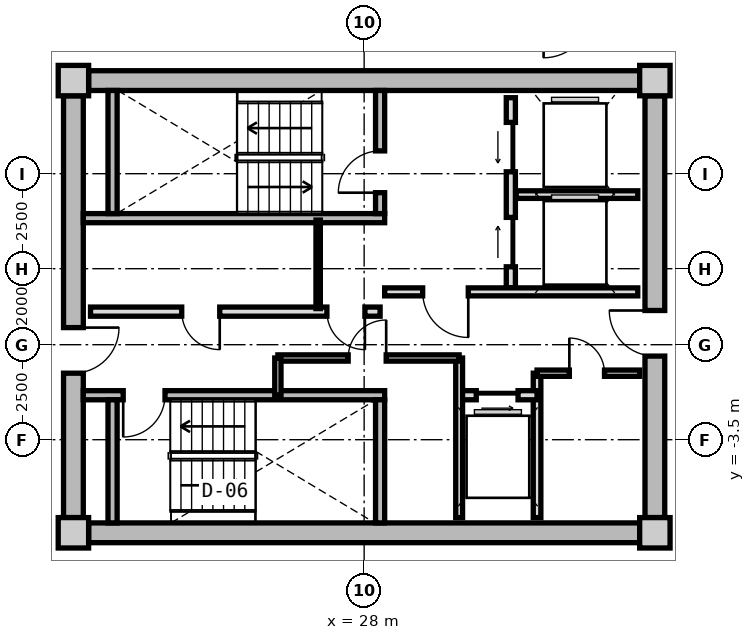
"""IFC4 building model, lengths in metres.
Left out: names, types, materials, properties, quantities, classifications, styles, units other than length and angle.
Written with IfcOpenShell. Run it as: python <this file> out.ifc"""

import sys

from ifc_helpers import new_model, si_unit, direction, frame, frame_2d, origin, origin_2d, place, context, subcontext, project, spatial, rectangle, extrude, source, transform, mapped, element, fill, save


model = new_model("IFC4")
c1 = context("Model", 3, precision=1e-05, world=origin(), true_north=direction((0.0, 1.0)))
c2 = subcontext(c1, "Body", "Model", "MODEL_VIEW")
j1 = project(units=[si_unit("LENGTHUNIT", "METRE"), si_unit("PLANEANGLEUNIT", "RADIAN")], contexts=[c1])
p1 = place(None, origin())
s1 = spatial("IfcSite", under=j1, at=p1, CompositionType="ELEMENT")
p2 = place(p1, origin())
s2 = spatial("IfcBuilding", under=s1, at=p2, CompositionType="ELEMENT")
p3 = place(p2, frame((0.0, 0.0, 213.9)))
s3 = spatial("IfcBuildingStorey", under=s2, at=p3, CompositionType="ELEMENT", Elevation=213.9)
m1 = source(origin(), c2, "Body", "SweptSolid", [
    extrude(rectangle(XDim=0.8, YDim=0.8, at=origin_2d()), origin(), (0.0, 0.0, 1.0), 3.05),
])
for number, where, z_axis, x_axis in (
    (1, (20.35, -5.95, 0.0), (0.0, 0.0, 1.0), (1.0, 0.0, 0.0)),
    (2, (35.65, -5.95, 0.0), (0.0, 0.0, 1.0), (1.0, 0.0, 0.0)),
    (3, (35.65, 5.95, 0.0), (0.0, 0.0, 1.0), (1.0, 0.0, 0.0)),
    (4, (20.35, 5.95, 0.0), (0.0, 0.0, 1.0), (1.0, 0.0, 0.0)),
):
    element("IfcColumn", number, at=place(p3, frame(where, z_axis=z_axis, x_axis=x_axis)), inside=s3, PredefinedType="COLUMN", context=c2, shape_type="MappedRepresentation", body=[
        mapped(m1, transform((0.0, 0.0, 0.0), x_axis=(1.0, 0.0, 0.0), y_axis=(0.0, 1.0, 0.0), z_axis=(0.0, 0.0, 1.0), scale=1.0)),
    ])
m2 = source(origin(), c2, "Body", "SweptSolid", [
    extrude(rectangle(XDim=14.5, YDim=0.52, at=frame_2d((7.25, 0.0))), origin(), (0.0, 0.0, 1.0), 2.76),
])
for number, where, z_axis, x_axis in (
    (5, (20.75, 5.95, 0.0), (0.0, 0.0, 1.0), (1.0, 0.0, 0.0)),
    (6, (35.25, -5.95, 0.0), (0.0, 0.0, 1.0), (-1.0, 0.0, 0.0)),
):
    element("IfcWall", number, at=place(p3, frame(where, z_axis=z_axis, x_axis=x_axis)), inside=s3, PredefinedType="SHEAR", context=c2, shape_type="MappedRepresentation", body=[
        mapped(m2, transform((0.0, 0.0, 0.0), x_axis=(1.0, 0.0, 0.0), y_axis=(0.0, 1.0, 0.0), z_axis=(0.0, 0.0, 1.0), scale=1.0)),
    ])
m3 = source(origin(), c2, "Body", "SweptSolid", [
    extrude(rectangle(XDim=11.1, YDim=0.52, at=frame_2d((5.55, 0.0))), origin(), (0.0, 0.0, 1.0), 2.76),
])
p4 = place(p3, frame((20.35, -5.55, 0.0), z_axis=(0.0, 0.0, 1.0), x_axis=(0.0, 1.0, 0.0)))
e7 = element("IfcWall", 7, at=p4, inside=s3, PredefinedType="SHEAR", context=c2, shape_type="MappedRepresentation", body=[
    mapped(m3, transform((0.0, 0.0, 0.0), x_axis=(1.0, 0.0, 0.0), y_axis=(0.0, 1.0, 0.0), z_axis=(0.0, 0.0, 1.0), scale=1.0)),
])
p5 = place(p4, frame((3.8, 0.0, 0.0)))
e8 = element("IfcOpeningElement", 8, at=p5, cuts=e7, PredefinedType="OPENING", context=c2, shape_type="SweptSolid", body=[
    extrude(rectangle(XDim=1.2, YDim=2.15, at=frame_2d((0.6, 1.075))), frame((0.0, 0.27, 0.0), z_axis=(0.0, -1.0, 0.0), x_axis=(1.0, 0.0, 0.0)), (0.0, 0.0, 1.0), 0.54),
])
p6 = place(p3, frame((35.65, 5.55, 0.0), z_axis=(0.0, 0.0, 1.0), x_axis=(0.0, -1.0, 0.0)))
e9 = element("IfcWall", 9, at=p6, inside=s3, PredefinedType="SHEAR", context=c2, shape_type="MappedRepresentation", body=[
    mapped(m3, transform((0.0, 0.0, 0.0), x_axis=(1.0, 0.0, 0.0), y_axis=(0.0, 1.0, 0.0), z_axis=(0.0, 0.0, 1.0), scale=1.0)),
])
p7 = place(p6, frame((5.65, 0.0, 0.0)))
e10 = element("IfcOpeningElement", 10, at=p7, cuts=e9, PredefinedType="OPENING", context=c2, shape_type="SweptSolid", body=[
    extrude(rectangle(XDim=1.2, YDim=2.15, at=frame_2d((0.6, 1.075))), frame((0.0, 0.27, 0.0), z_axis=(0.0, -1.0, 0.0), x_axis=(1.0, 0.0, 0.0)), (0.0, 0.0, 1.0), 0.54),
])
m4 = source(origin(), c2, "Body", "SweptSolid", [
    extrude(rectangle(XDim=7.93, YDim=0.24, at=frame_2d((3.965, 0.0))), origin(), (0.0, 0.0, 1.0), 2.76),
])
p8 = place(p3, frame((20.61, 2.33, 0.0), z_axis=(0.0, 0.0, 1.0), x_axis=(1.0, 0.0, 0.0)))
e11 = element("IfcWall", 11, at=p8, inside=s3, PredefinedType="PARTITIONING", context=c2, shape_type="MappedRepresentation", body=[
    mapped(m4, transform((0.0, 0.0, 0.0), x_axis=(1.0, 0.0, 0.0), y_axis=(0.0, 1.0, 0.0), z_axis=(0.0, 0.0, 1.0), scale=1.0)),
])
m5 = source(origin(), c2, "Body", "SweptSolid", [
    extrude(rectangle(XDim=3.24, YDim=0.24, at=frame_2d((1.62, 0.0))), origin(), (0.0, 0.0, 1.0), 2.76),
])
p9 = place(p3, frame((21.38, 2.45, 0.0), z_axis=(0.0, 0.0, 1.0), x_axis=(0.0, 1.0, 0.0)))
e12 = element("IfcWall", 12, at=p9, inside=s3, PredefinedType="PARTITIONING", context=c2, shape_type="MappedRepresentation", body=[
    mapped(m5, transform((0.0, 0.0, 0.0), x_axis=(1.0, 0.0, 0.0), y_axis=(0.0, 1.0, 0.0), z_axis=(0.0, 0.0, 1.0), scale=1.0)),
])
p10 = place(p3, frame((28.42, 2.45, 0.0), z_axis=(0.0, 0.0, 1.0), x_axis=(0.0, 1.0, 0.0)))
e13 = element("IfcWall", 13, at=p10, inside=s3, PredefinedType="PARTITIONING", context=c2, shape_type="MappedRepresentation", body=[
    mapped(m5, transform((0.0, 0.0, 0.0), x_axis=(1.0, 0.0, 0.0), y_axis=(0.0, 1.0, 0.0), z_axis=(0.0, 0.0, 1.0), scale=1.0)),
])
p11 = place(p10, frame((0.55, 0.0, 0.0)))
e14 = element("IfcOpeningElement", 14, at=p11, cuts=e13, PredefinedType="OPENING", context=c2, shape_type="SweptSolid", body=[
    extrude(rectangle(XDim=1.1, YDim=2.15, at=frame_2d((0.55, 1.075))), frame((0.0, 0.13, 0.0), z_axis=(0.0, -1.0, 0.0), x_axis=(1.0, 0.0, 0.0)), (0.0, 0.0, 1.0), 0.26),
])
p12 = place(p3, frame((20.61, -2.33, 0.0), z_axis=(0.0, 0.0, 1.0), x_axis=(1.0, 0.0, 0.0)))
e15 = element("IfcWall", 15, at=p12, inside=s3, PredefinedType="PARTITIONING", context=c2, shape_type="MappedRepresentation", body=[
    mapped(m4, transform((0.0, 0.0, 0.0), x_axis=(1.0, 0.0, 0.0), y_axis=(0.0, 1.0, 0.0), z_axis=(0.0, 0.0, 1.0), scale=1.0)),
])
p13 = place(p12, frame((1.05, 0.0, 0.0)))
e16 = element("IfcOpeningElement", 16, at=p13, cuts=e15, PredefinedType="OPENING", context=c2, shape_type="SweptSolid", body=[
    extrude(rectangle(XDim=1.1, YDim=2.15, at=frame_2d((0.55, 1.075))), frame((0.0, 0.13, 0.0), z_axis=(0.0, -1.0, 0.0), x_axis=(1.0, 0.0, 0.0)), (0.0, 0.0, 1.0), 0.26),
])
for number, where, z_axis, x_axis in (
    (17, (21.38, -5.69, 0.0), (0.0, 0.0, 1.0), (0.0, 1.0, 0.0)),
    (18, (28.42, -5.69, 0.0), (0.0, 0.0, 1.0), (0.0, 1.0, 0.0)),
):
    element("IfcWall", number, at=place(p3, frame(where, z_axis=z_axis, x_axis=x_axis)), inside=s3, PredefinedType="PARTITIONING", context=c2, shape_type="MappedRepresentation", body=[
        mapped(m5, transform((0.0, 0.0, 0.0), x_axis=(1.0, 0.0, 0.0), y_axis=(0.0, 1.0, 0.0), z_axis=(0.0, 0.0, 1.0), scale=1.0)),
    ])
m6 = source(origin(), c2, "Body", "SweptSolid", [
    extrude(rectangle(XDim=5.0, YDim=0.24, at=frame_2d((2.5, 0.0))), origin(), (0.0, 0.0, 1.0), 2.745),
])
p14 = place(p3, frame((31.86, 0.5, 0.0), z_axis=(0.0, 0.0, 1.0), x_axis=(0.0, 1.0, 0.0)))
e19 = element("IfcWall", 19, at=p14, inside=s3, PredefinedType="PARTITIONING", context=c2, shape_type="MappedRepresentation", body=[
    mapped(m6, transform((0.0, 0.0, 0.0), x_axis=(1.0, 0.0, 0.0), y_axis=(0.0, 1.0, 0.0), z_axis=(0.0, 0.0, 1.0), scale=1.0)),
])
p15 = place(p14, frame((3.05, 0.0, 0.0)))
e20 = element("IfcOpeningElement", 20, at=p15, cuts=e19, PredefinedType="OPENING", context=c2, shape_type="SweptSolid", body=[
    extrude(rectangle(XDim=1.3, YDim=2.2, at=frame_2d((0.65, 1.1))), frame((0.0, 0.13, 0.0), z_axis=(0.0, -1.0, 0.0), x_axis=(1.0, 0.0, 0.0)), (0.0, 0.0, 1.0), 0.26),
])
p16 = place(p14, frame((0.55, 0.0, 0.0)))
e21 = element("IfcOpeningElement", 21, at=p16, cuts=e19, PredefinedType="OPENING", context=c2, shape_type="SweptSolid", body=[
    extrude(rectangle(XDim=1.3, YDim=2.2, at=frame_2d((0.65, 1.1))), frame((0.0, 0.13, 0.0), z_axis=(0.0, -1.0, 0.0), x_axis=(1.0, 0.0, 0.0)), (0.0, 0.0, 1.0), 0.26),
])
m7 = source(origin(), c2, "Body", "SweptSolid", [
    extrude(rectangle(XDim=3.2, YDim=0.2, at=frame_2d((1.6, 0.0))), origin(), (0.0, 0.0, 1.0), 2.745),
])
p17 = place(p3, frame((32.0, 2.95, 0.0), z_axis=(0.0, 0.0, 1.0), x_axis=(1.0, 0.0, 0.0)))
e22 = element("IfcWall", 22, at=p17, inside=s3, PredefinedType="PARTITIONING", context=c2, shape_type="MappedRepresentation", body=[
    mapped(m7, transform((0.0, 0.0, 0.0), x_axis=(1.0, 0.0, 0.0), y_axis=(0.0, 1.0, 0.0), z_axis=(0.0, 0.0, 1.0), scale=1.0)),
])
m8 = source(origin(), c2, "Body", "SweptSolid", [
    extrude(rectangle(XDim=6.66, YDim=0.21, at=frame_2d((3.33, 0.0))), origin(), (0.0, 0.0, 1.0), 2.745),
])
p18 = place(p3, frame((28.54, 0.39, 0.0), z_axis=(0.0, 0.0, 1.0), x_axis=(1.0, 0.0, 0.0)))
e23 = element("IfcWall", 23, at=p18, inside=s3, PredefinedType="PARTITIONING", context=c2, shape_type="MappedRepresentation", body=[
    mapped(m8, transform((0.0, 0.0, 0.0), x_axis=(1.0, 0.0, 0.0), y_axis=(0.0, 1.0, 0.0), z_axis=(0.0, 0.0, 1.0), scale=1.0)),
])
p19 = place(p18, frame((1.0, 0.0, 0.0)))
e24 = element("IfcOpeningElement", 24, at=p19, cuts=e23, PredefinedType="OPENING", context=c2, shape_type="SweptSolid", body=[
    extrude(rectangle(XDim=1.2, YDim=2.15, at=frame_2d((0.6, 1.075))), frame((0.0, 0.115, 0.0), z_axis=(0.0, -1.0, 0.0), x_axis=(1.0, 0.0, 0.0)), (0.0, 0.0, 1.0), 0.23),
])
m9 = source(origin(), c2, "Body", "SweptSolid", [
    extrude(rectangle(XDim=7.62, YDim=0.24, at=frame_2d((3.81, 0.0))), origin(), (0.0, 0.0, 1.0), 2.745),
])
p20 = place(p3, frame((20.8, -0.13, 0.0), z_axis=(0.0, 0.0, 1.0), x_axis=(1.0, 0.0, 0.0)))
e25 = element("IfcWall", 25, at=p20, inside=s3, PredefinedType="PARTITIONING", context=c2, shape_type="MappedRepresentation", body=[
    mapped(m9, transform((0.0, 0.0, 0.0), x_axis=(1.0, 0.0, 0.0), y_axis=(0.0, 1.0, 0.0), z_axis=(0.0, 0.0, 1.0), scale=1.0)),
])
p21 = place(p20, frame((6.22, 0.0, 0.0)))
e26 = element("IfcOpeningElement", 26, at=p21, cuts=e25, PredefinedType="OPENING", context=c2, shape_type="SweptSolid", body=[
    extrude(rectangle(XDim=1.0, YDim=2.1, at=frame_2d((0.5, 1.05))), frame((0.0, 0.13, 0.0), z_axis=(0.0, -1.0, 0.0), x_axis=(1.0, 0.0, 0.0)), (0.0, 0.0, 1.0), 0.26),
])
p22 = place(p20, frame((2.4, 0.0, 0.0)))
e27 = element("IfcOpeningElement", 27, at=p22, cuts=e25, PredefinedType="OPENING", context=c2, shape_type="SweptSolid", body=[
    extrude(rectangle(XDim=1.0, YDim=2.1, at=frame_2d((0.5, 1.05))), frame((0.0, 0.13, 0.0), z_axis=(0.0, -1.0, 0.0), x_axis=(1.0, 0.0, 0.0)), (0.0, 0.0, 1.0), 0.26),
])
m10 = source(origin(), c2, "Body", "SweptSolid", [
    extrude(rectangle(XDim=2.33, YDim=0.115, at=frame_2d((1.165, 0.0))), origin(), (0.0, 0.0, 1.0), 2.745),
])
p23 = place(p3, frame((26.79, -0.05, 0.0), z_axis=(0.0, 0.0, 1.0), x_axis=(0.0, 1.0, 0.0)))
e28 = element("IfcWall", 28, at=p23, inside=s3, PredefinedType="PARTITIONING", context=c2, shape_type="MappedRepresentation", body=[
    mapped(m10, transform((0.0, 0.0, 0.0), x_axis=(1.0, 0.0, 0.0), y_axis=(0.0, 1.0, 0.0), z_axis=(0.0, 0.0, 1.0), scale=1.0)),
])
m11 = source(origin(), c2, "Body", "SweptSolid", [
    extrude(rectangle(XDim=3.8, YDim=0.2, at=frame_2d((1.9, 0.0))), origin(), (0.0, 0.0, 1.0), 2.745),
])
p24 = place(p3, frame((32.55, -5.55, 0.0), z_axis=(0.0, 0.0, 1.0), x_axis=(0.0, 1.0, 0.0)))
e29 = element("IfcWall", 29, at=p24, inside=s3, PredefinedType="PARTITIONING", context=c2, shape_type="MappedRepresentation", body=[
    mapped(m11, transform((0.0, 0.0, 0.0), x_axis=(1.0, 0.0, 0.0), y_axis=(0.0, 1.0, 0.0), z_axis=(0.0, 0.0, 1.0), scale=1.0)),
])
m12 = source(origin(), c2, "Body", "SweptSolid", [
    extrude(rectangle(XDim=2.05, YDim=0.24, at=frame_2d((1.025, 0.0))), origin(), (0.0, 0.0, 1.0), 2.745),
])
p25 = place(p3, frame((30.5, -2.33, 0.0), z_axis=(0.0, 0.0, 1.0), x_axis=(1.0, 0.0, 0.0)))
e30 = element("IfcWall", 30, at=p25, inside=s3, PredefinedType="PARTITIONING", context=c2, shape_type="MappedRepresentation", body=[
    mapped(m12, transform((0.0, 0.0, 0.0), x_axis=(1.0, 0.0, 0.0), y_axis=(0.0, 1.0, 0.0), z_axis=(0.0, 0.0, 1.0), scale=1.0)),
])
p26 = place(p25, frame((0.45, 0.0, 0.0)))
e31 = element("IfcOpeningElement", 31, at=p26, cuts=e30, PredefinedType="OPENING", context=c2, shape_type="SweptSolid", body=[
    extrude(rectangle(XDim=1.1, YDim=2.2, at=frame_2d((0.55, 1.1))), frame((0.0, 0.13, 0.0), z_axis=(0.0, -1.0, 0.0), x_axis=(1.0, 0.0, 0.0)), (0.0, 0.0, 1.0), 0.26),
])
m13 = source(origin(), c2, "Body", "SweptSolid", [
    extrude(rectangle(XDim=4.2, YDim=0.18, at=frame_2d((2.1, 0.0))), origin(), (0.0, 0.0, 1.0), 2.745),
])
p27 = place(p3, frame((30.5, -5.55, 0.0), z_axis=(0.0, 0.0, 1.0), x_axis=(0.0, 1.0, 0.0)))
e32 = element("IfcWall", 32, at=p27, inside=s3, PredefinedType="PARTITIONING", context=c2, shape_type="MappedRepresentation", body=[
    mapped(m13, transform((0.0, 0.0, 0.0), x_axis=(1.0, 0.0, 0.0), y_axis=(0.0, 1.0, 0.0), z_axis=(0.0, 0.0, 1.0), scale=1.0)),
])
m14 = source(origin(), c2, "Body", "SweptSolid", [
    extrude(rectangle(XDim=4.77, YDim=0.165, at=frame_2d((2.385, 0.0))), origin(), (0.0, 0.0, 1.0), 2.745),
])
p28 = place(p3, frame((25.73, -1.35, 0.0), z_axis=(0.0, 0.0, 1.0), x_axis=(1.0, 0.0, 0.0)))
e33 = element("IfcWall", 33, at=p28, inside=s3, PredefinedType="PARTITIONING", context=c2, shape_type="MappedRepresentation", body=[
    mapped(m14, transform((0.0, 0.0, 0.0), x_axis=(1.0, 0.0, 0.0), y_axis=(0.0, 1.0, 0.0), z_axis=(0.0, 0.0, 1.0), scale=1.0)),
])
p29 = place(p28, frame((1.85, 0.0, 0.0)))
e34 = element("IfcOpeningElement", 34, at=p29, cuts=e33, PredefinedType="OPENING", context=c2, shape_type="SweptSolid", body=[
    extrude(rectangle(XDim=1.0, YDim=2.1, at=frame_2d((0.5, 1.05))), frame((0.0, 0.093, 0.0), z_axis=(0.0, -1.0, 0.0), x_axis=(1.0, 0.0, 0.0)), (0.0, 0.0, 1.0), 0.185),
])
m15 = source(origin(), c2, "Body", "SweptSolid", [
    extrude(rectangle(XDim=0.98, YDim=0.165, at=frame_2d((0.49, 0.0))), origin(), (0.0, 0.0, 1.0), 2.745),
])
p30 = place(p3, frame((25.73, -2.33, 0.0), z_axis=(0.0, 0.0, 1.0), x_axis=(0.0, 1.0, 0.0)))
e35 = element("IfcWall", 35, at=p30, inside=s3, PredefinedType="PARTITIONING", context=c2, shape_type="MappedRepresentation", body=[
    mapped(m15, transform((0.0, 0.0, 0.0), x_axis=(1.0, 0.0, 0.0), y_axis=(0.0, 1.0, 0.0), z_axis=(0.0, 0.0, 1.0), scale=1.0)),
])
m16 = source(origin(), c2, "Body", "SweptSolid", [
    extrude(rectangle(XDim=2.7, YDim=0.165, at=frame_2d((1.35, 0.0))), origin(), (0.0, 0.0, 1.0), 2.745),
])
p31 = place(p3, frame((32.55, -1.75, 0.0), z_axis=(0.0, 0.0, 1.0), x_axis=(1.0, 0.0, 0.0)))
e36 = element("IfcWall", 36, at=p31, inside=s3, PredefinedType="PARTITIONING", context=c2, shape_type="MappedRepresentation", body=[
    mapped(m16, transform((0.0, 0.0, 0.0), x_axis=(1.0, 0.0, 0.0), y_axis=(0.0, 1.0, 0.0), z_axis=(0.0, 0.0, 1.0), scale=1.0)),
])
p32 = place(p31, frame((0.85, 0.0, 0.0)))
e37 = element("IfcOpeningElement", 37, at=p32, cuts=e36, PredefinedType="OPENING", context=c2, shape_type="SweptSolid", body=[
    extrude(rectangle(XDim=0.925, YDim=2.1, at=frame_2d((0.462, 1.05))), frame((0.0, 0.093, 0.0), z_axis=(0.0, -1.0, 0.0), x_axis=(1.0, 0.0, 0.0)), (0.0, 0.0, 1.0), 0.185),
])
m17 = source(origin(), c2, "Body", "SweptSolid", [
    extrude(rectangle(XDim=1.1, YDim=2.15, at=frame_2d((0.55, 1.075))), frame((0.0, 0.025, 0.0), z_axis=(0.0, -1.0, 0.0), x_axis=(1.0, 0.0, 0.0)), (0.0, 0.0, 1.0), 0.05),
])
p33 = place(p11, origin())
e38 = element("IfcDoor", 38, at=p33, inside=s3, OperationType="SINGLE_SWING_LEFT", PredefinedType="DOOR", context=c2, shape_type="MappedRepresentation", body=[
    mapped(m17, transform((0.0, 0.0, 0.0), x_axis=(1.0, 0.0, 0.0), y_axis=(0.0, 1.0, 0.0), z_axis=(0.0, 0.0, 1.0), scale=1.0)),
])
fill(e14, e38)
p34 = place(p13, frame((1.1, 0.0, 0.0), z_axis=(0.0, 0.0, 1.0), x_axis=(-1.0, 0.0, 0.0)))
e39 = element("IfcDoor", 39, at=p34, inside=s3, OperationType="SINGLE_SWING_RIGHT", PredefinedType="DOOR", context=c2, shape_type="MappedRepresentation", body=[
    mapped(m17, transform((0.0, 0.0, 0.0), x_axis=(1.0, 0.0, 0.0), y_axis=(0.0, 1.0, 0.0), z_axis=(0.0, 0.0, 1.0), scale=1.0)),
])
fill(e16, e39)
m18 = source(origin(), c2, "Body", "SweptSolid", [
    extrude(rectangle(XDim=1.3, YDim=2.2, at=frame_2d((0.65, 1.1))), frame((0.0, 0.025, 0.0), z_axis=(0.0, -1.0, 0.0), x_axis=(1.0, 0.0, 0.0)), (0.0, 0.0, 1.0), 0.05),
])
p35 = place(p15, origin())
e40 = element("IfcDoor", 40, at=p35, inside=s3, OperationType="SLIDING_TO_LEFT", PredefinedType="DOOR", context=c2, shape_type="MappedRepresentation", body=[
    mapped(m18, transform((0.0, 0.0, 0.0), x_axis=(1.0, 0.0, 0.0), y_axis=(0.0, 1.0, 0.0), z_axis=(0.0, 0.0, 1.0), scale=1.0)),
])
fill(e20, e40)
p36 = place(p16, origin())
e41 = element("IfcDoor", 41, at=p36, inside=s3, OperationType="SLIDING_TO_RIGHT", PredefinedType="DOOR", context=c2, shape_type="MappedRepresentation", body=[
    mapped(m18, transform((0.0, 0.0, 0.0), x_axis=(1.0, 0.0, 0.0), y_axis=(0.0, 1.0, 0.0), z_axis=(0.0, 0.0, 1.0), scale=1.0)),
])
fill(e21, e41)
m19 = source(origin(), c2, "Body", "SweptSolid", [
    extrude(rectangle(XDim=1.2, YDim=2.15, at=frame_2d((0.6, 1.075))), frame((0.0, 0.025, 0.0), z_axis=(0.0, -1.0, 0.0), x_axis=(1.0, 0.0, 0.0)), (0.0, 0.0, 1.0), 0.05),
])
p37 = place(p19, frame((1.2, 0.0, 0.0), z_axis=(0.0, 0.0, 1.0), x_axis=(-1.0, 0.0, 0.0)))
e42 = element("IfcDoor", 42, at=p37, inside=s3, OperationType="SINGLE_SWING_LEFT", PredefinedType="DOOR", context=c2, shape_type="MappedRepresentation", body=[
    mapped(m19, transform((0.0, 0.0, 0.0), x_axis=(1.0, 0.0, 0.0), y_axis=(0.0, 1.0, 0.0), z_axis=(0.0, 0.0, 1.0), scale=1.0)),
])
fill(e24, e42)
p38 = place(p5, frame((1.2, 0.0, 0.0), z_axis=(0.0, 0.0, 1.0), x_axis=(-1.0, 0.0, 0.0)))
e43 = element("IfcDoor", 43, at=p38, inside=s3, OperationType="SINGLE_SWING_LEFT", PredefinedType="DOOR", context=c2, shape_type="MappedRepresentation", body=[
    mapped(m19, transform((0.0, 0.0, 0.0), x_axis=(1.0, 0.0, 0.0), y_axis=(0.0, 1.0, 0.0), z_axis=(0.0, 0.0, 1.0), scale=1.0)),
])
fill(e8, e43)
p39 = place(p7, frame((1.2, 0.0, 0.0), z_axis=(0.0, 0.0, 1.0), x_axis=(-1.0, 0.0, 0.0)))
e44 = element("IfcDoor", 44, at=p39, inside=s3, OperationType="SINGLE_SWING_RIGHT", PredefinedType="DOOR", context=c2, shape_type="MappedRepresentation", body=[
    mapped(m19, transform((0.0, 0.0, 0.0), x_axis=(1.0, 0.0, 0.0), y_axis=(0.0, 1.0, 0.0), z_axis=(0.0, 0.0, 1.0), scale=1.0)),
])
fill(e10, e44)
m20 = source(origin(), c2, "Body", "SweptSolid", [
    extrude(rectangle(XDim=1.0, YDim=2.1, at=frame_2d((0.5, 1.05))), frame((0.0, 0.025, 0.0), z_axis=(0.0, -1.0, 0.0), x_axis=(1.0, 0.0, 0.0)), (0.0, 0.0, 1.0), 0.05),
])
p40 = place(p21, frame((1.0, 0.0, 0.0), z_axis=(0.0, 0.0, 1.0), x_axis=(-1.0, 0.0, 0.0)))
e45 = element("IfcDoor", 45, at=p40, inside=s3, OperationType="SINGLE_SWING_LEFT", PredefinedType="DOOR", context=c2, shape_type="MappedRepresentation", body=[
    mapped(m20, transform((0.0, 0.0, 0.0), x_axis=(1.0, 0.0, 0.0), y_axis=(0.0, 1.0, 0.0), z_axis=(0.0, 0.0, 1.0), scale=1.0)),
])
fill(e26, e45)
p41 = place(p22, frame((1.0, 0.0, 0.0), z_axis=(0.0, 0.0, 1.0), x_axis=(-1.0, 0.0, 0.0)))
e46 = element("IfcDoor", 46, at=p41, inside=s3, OperationType="SINGLE_SWING_LEFT", PredefinedType="DOOR", context=c2, shape_type="MappedRepresentation", body=[
    mapped(m20, transform((0.0, 0.0, 0.0), x_axis=(1.0, 0.0, 0.0), y_axis=(0.0, 1.0, 0.0), z_axis=(0.0, 0.0, 1.0), scale=1.0)),
])
fill(e27, e46)
m21 = source(origin(), c2, "Body", "SweptSolid", [
    extrude(rectangle(XDim=1.1, YDim=2.2, at=frame_2d((0.55, 1.1))), frame((0.0, 0.025, 0.0), z_axis=(0.0, -1.0, 0.0), x_axis=(1.0, 0.0, 0.0)), (0.0, 0.0, 1.0), 0.05),
])
p42 = place(p26, frame((1.1, 0.0, 0.0), z_axis=(0.0, 0.0, 1.0), x_axis=(-1.0, 0.0, 0.0)))
e47 = element("IfcDoor", 47, at=p42, inside=s3, OperationType="SLIDING_TO_RIGHT", PredefinedType="DOOR", context=c2, shape_type="MappedRepresentation", body=[
    mapped(m21, transform((0.0, 0.0, 0.0), x_axis=(1.0, 0.0, 0.0), y_axis=(0.0, 1.0, 0.0), z_axis=(0.0, 0.0, 1.0), scale=1.0)),
])
fill(e31, e47)
p43 = place(p29, origin())
e48 = element("IfcDoor", 48, at=p43, inside=s3, OperationType="SINGLE_SWING_RIGHT", PredefinedType="DOOR", context=c2, shape_type="MappedRepresentation", body=[
    mapped(m20, transform((0.0, 0.0, 0.0), x_axis=(1.0, 0.0, 0.0), y_axis=(0.0, 1.0, 0.0), z_axis=(0.0, 0.0, 1.0), scale=1.0)),
])
fill(e34, e48)
m22 = source(origin(), c2, "Body", "SweptSolid", [
    extrude(rectangle(XDim=0.925, YDim=2.1, at=frame_2d((0.462, 1.05))), frame((0.0, 0.025, 0.0), z_axis=(0.0, -1.0, 0.0), x_axis=(1.0, 0.0, 0.0)), (0.0, 0.0, 1.0), 0.05),
])
p44 = place(p32, origin())
e49 = element("IfcDoor", 49, at=p44, inside=s3, OperationType="SINGLE_SWING_LEFT", PredefinedType="DOOR", context=c2, shape_type="MappedRepresentation", body=[
    mapped(m22, transform((0.0, 0.0, 0.0), x_axis=(1.0, 0.0, 0.0), y_axis=(0.0, 1.0, 0.0), z_axis=(0.0, 0.0, 1.0), scale=1.0)),
])
fill(e37, e49)
save(model, sys.argv[1])
